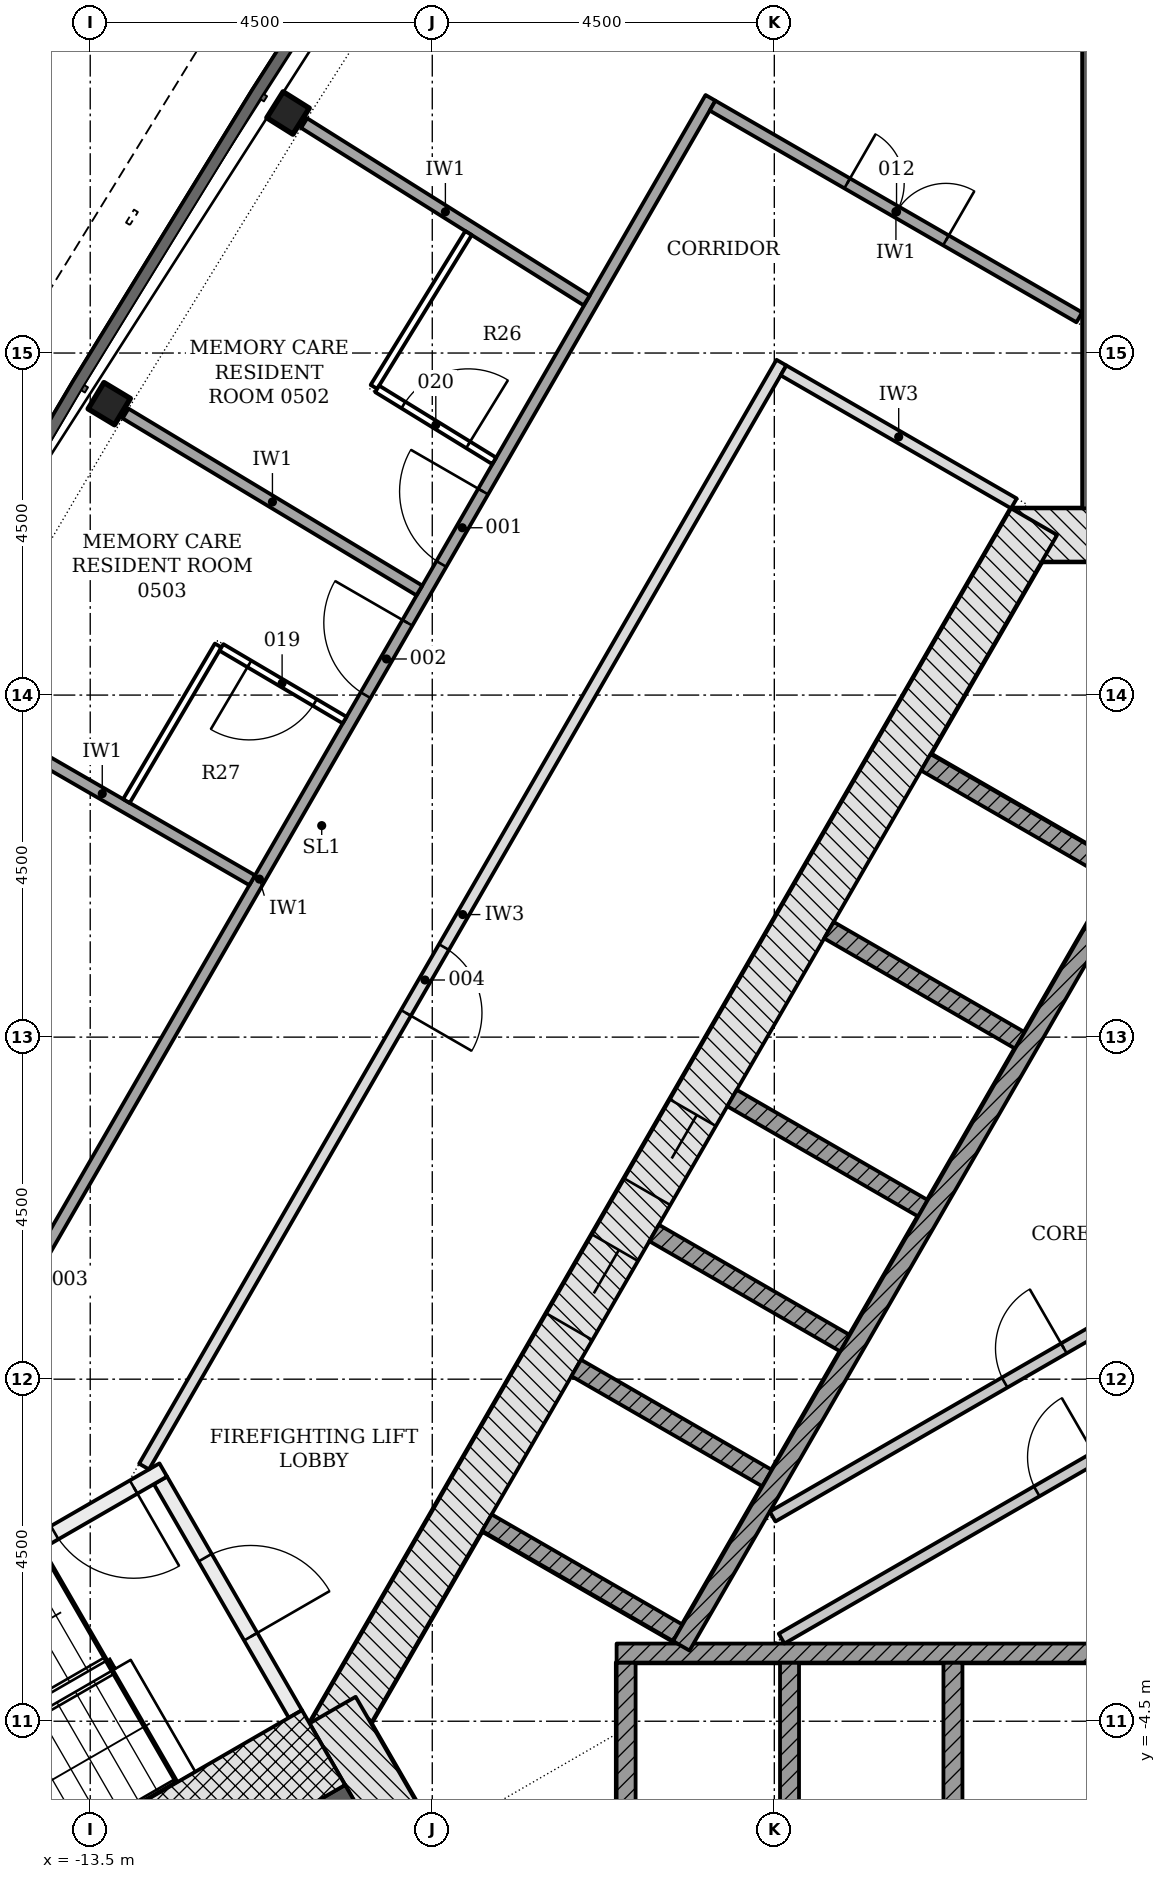
"""IFC4 building model, lengths in metres.
Left out: names, types, materials, properties, quantities, classifications, styles, units other than length and angle.
Written with IfcOpenShell. Run it as: python <this file> out.ifc"""

import sys

from ifc_helpers import new_model, si_unit, direction, frame, frame_2d, origin, origin_2d, place, context, subcontext, project, spatial, rectangle, i_section, extrude, element, fill, save


model = new_model("IFC4")
c1 = context("Model", 3, precision=1e-05, world=origin(), true_north=direction((0.0, 1.0)))
c2 = subcontext(c1, "Body", "Model", "MODEL_VIEW")
j1 = project(units=[si_unit("LENGTHUNIT", "METRE"), si_unit("PLANEANGLEUNIT", "RADIAN")], contexts=[c1])
p1 = place(None, origin())
s1 = spatial("IfcSite", under=j1, at=p1, CompositionType="ELEMENT")
p2 = place(p1, origin())
s2 = spatial("IfcBuilding", under=s1, at=p2, CompositionType="ELEMENT")
p3 = place(p2, frame((0.0, 0.0, 24.0)))
s3 = spatial("IfcBuildingStorey", under=s2, at=p3, CompositionType="ELEMENT", Elevation=24.0)
p4 = place(p3, frame((1.386, 11.106, -0.2), z_axis=(0.0, 0.0, 1.0), x_axis=(-1.0, 0.0, 0.0)))
e1 = element("IfcWall", 1, at=p4, inside=s3, PredefinedType="SHEAR", context=c2, shape_type="SweptSolid", body=[
    extrude(rectangle(XDim=2.771, YDim=0.7, at=frame_2d((1.386, 0.0))), origin(), (0.0, 0.0, 1.0), 3.6),
])
p5 = place(p3, frame((-1.083, 11.281, -0.2), z_axis=(0.0, 0.0, 1.0), x_axis=(-0.500001446645, -0.866024568562, 0.0)))
e2 = element("IfcWall", 2, at=p5, inside=s3, PredefinedType="SHEAR", context=c2, shape_type="SweptSolid", body=[
    extrude(rectangle(XDim=18.458, YDim=0.7, at=frame_2d((9.229, 0.0))), origin(), (0.0, 0.0, 1.0), 3.6),
])
p6 = place(p5, frame((8.979, 0.0, 0.2)))
e3 = element("IfcOpeningElement", 3, at=p6, cuts=e2, PredefinedType="OPENING", context=c2, shape_type="SweptSolid", body=[
    extrude(rectangle(XDim=1.2, YDim=2.1, at=frame_2d((0.6, 1.05))), frame((0.0, 0.36, 0.0), z_axis=(0.0, -1.0, 0.0), x_axis=(1.0, 0.0, 0.0)), (0.0, 0.0, 1.0), 0.72),
])
p7 = place(p5, frame((11.029, 0.0, 0.2)))
e4 = element("IfcOpeningElement", 4, at=p7, cuts=e2, PredefinedType="OPENING", context=c2, shape_type="SweptSolid", body=[
    extrude(rectangle(XDim=1.2, YDim=2.1, at=frame_2d((0.6, 1.05))), frame((0.0, 0.36, 0.0), z_axis=(0.0, -1.0, 0.0), x_axis=(1.0, 0.0, 0.0)), (0.0, 0.0, 1.0), 0.72),
])
p8 = place(p3, frame((-10.311, -4.353, -0.2), z_axis=(0.0, 0.0, 1.0), x_axis=(0.500042739161, -0.866000726912, 0.0)))
e5 = element("IfcWall", 5, at=p8, inside=s3, PredefinedType="SHEAR", context=c2, shape_type="SweptSolid", body=[
    extrude(rectangle(XDim=2.771, YDim=0.7, at=frame_2d((1.386, 0.0))), origin(), (0.0, 0.0, 1.0), 3.6),
])
p9 = place(p3, frame((0.0, 11.456, -0.2), z_axis=(0.0, 0.0, 1.0), x_axis=(0.0, 1.0, 0.0)))
e6 = element("IfcWall", 6, at=p9, inside=s3, PredefinedType="SHEAR", context=c2, shape_type="SweptSolid", body=[
    extrude(rectangle(XDim=14.633, YDim=0.9, at=frame_2d((7.316, 0.0))), origin(), (0.0, 0.0, 1.0), 3.6),
])
p10 = place(p3, frame((-9.922, -5.728, -0.2), z_axis=(0.0, 0.0, 1.0), x_axis=(-0.866028046028, -0.499995423472, 0.0)))
e7 = element("IfcWall", 7, at=p10, inside=s3, PredefinedType="SHEAR", context=c2, shape_type="SweptSolid", body=[
    extrude(rectangle(XDim=14.633, YDim=0.9, at=frame_2d((7.316, 0.0))), origin(), (0.0, 0.0, 1.0), 3.6),
])
for number, where, z_axis, x_axis in (
    (8, (-10.897, 16.658, -0.2), (0.0, 0.0, 1.0), (-0.532, -0.847, 0.0)),
    (9, (-13.25, 12.834, -0.2), (0.0, 0.0, 1.0), (-0.516, -0.857, 0.0)),
):
    element("IfcColumn", number, at=place(p3, frame(where, z_axis=z_axis, x_axis=x_axis)), inside=s3, PredefinedType="COLUMN", context=c2, shape_type="SweptSolid", body=[
        extrude(i_section(OverallWidth=0.404, OverallDepth=0.406, WebThickness=0.027, FlangeThickness=0.044, FilletRadius=0.015, at=origin_2d()), origin(), (0.0, 0.0, 1.0), 3.6),
    ])
for number, where, z_axis, x_axis in (
    (10, (-6.45, -6.228, -0.2), (0.0, 0.0, 1.0), (0.0, 1.0, 0.0)),
    (11, (-4.3, -6.228, -0.2), (0.0, 0.0, 1.0), (0.0, 1.0, 0.0)),
    (12, (-2.15, -6.228, -0.2), (0.0, 0.0, 1.0), (0.0, 1.0, 0.0)),
):
    element("IfcWall", number, at=place(p3, frame(where, z_axis=z_axis, x_axis=x_axis)), inside=s3, PredefinedType="PARTITIONING", context=c2, shape_type="SweptSolid", body=[
        extrude(rectangle(XDim=2.5, YDim=0.25, at=frame_2d((1.25, 0.0))), origin(), (0.0, 0.0, 1.0), 3.6),
    ])
p11 = place(p3, frame((-6.575, -3.603, 0.0), z_axis=(0.0, 0.0, 1.0), x_axis=(1.0, 0.0, 0.0)))
e13 = element("IfcWall", 13, at=p11, inside=s3, PredefinedType="PARTITIONING", context=c2, shape_type="SweptSolid", body=[
    extrude(rectangle(XDim=13.15, YDim=0.25, at=frame_2d((6.575, 0.0))), origin(), (0.0, 0.0, 1.0), 3.4),
])
p12 = place(p3, frame((-2.506, 8.115, -0.2), z_axis=(0.0, 0.0, 1.0), x_axis=(0.865996321171, -0.50005036918, 0.0)))
e14 = element("IfcWall", 14, at=p12, inside=s3, PredefinedType="PARTITIONING", context=c2, shape_type="SweptSolid", body=[
    extrude(rectangle(XDim=2.9, YDim=0.25, at=frame_2d((1.45, 0.0))), origin(), (0.0, 0.0, 1.0), 3.6),
])
for number, where, z_axis, x_axis in (
    (15, (-3.781, 5.907, -0.2), (0.0, 0.0, 1.0), (0.866, -0.5, 0.0)),
    (16, (-5.056, 3.699, -0.2), (0.0, 0.0, 1.0), (0.866, -0.5, 0.0)),
    (17, (-6.081, 1.923, -0.2), (0.0, 0.0, 1.0), (0.866, -0.5, 0.0)),
    (18, (-7.106, 0.148, -0.2), (0.0, 0.0, 1.0), (0.866, -0.5, 0.0)),
    (19, (-8.281, -1.887, -0.2), (0.0, 0.0, 1.0), (0.866, -0.5, 0.0)),
):
    element("IfcWall", number, at=place(p3, frame(where, z_axis=z_axis, x_axis=x_axis)), inside=s3, PredefinedType="PARTITIONING", context=c2, shape_type="SweptSolid", body=[
        extrude(rectangle(XDim=2.9, YDim=0.25, at=frame_2d((1.45, 0.0))), origin(), (0.0, 0.0, 1.0), 3.6),
    ])
p13 = place(p3, frame((0.176, 6.711, 0.0), z_axis=(0.0, 0.0, 1.0), x_axis=(-0.500004227369, -0.866022963098, 0.0)))
e20 = element("IfcWall", 20, at=p13, inside=s3, PredefinedType="PARTITIONING", context=c2, shape_type="SweptSolid", body=[
    extrude(rectangle(XDim=11.8, YDim=0.25, at=frame_2d((5.9, 0.0))), origin(), (0.0, 0.0, 1.0), 3.4),
])
p14 = place(p3, frame((-4.523, -1.807, 0.0), z_axis=(0.0, 0.0, 1.0), x_axis=(0.866030300338, 0.499991518824, 0.0)))
e21 = element("IfcWall", 21, at=p14, inside=s3, PredefinedType="PARTITIONING", context=c2, shape_type="SweptSolid", body=[
    extrude(rectangle(XDim=11.049, YDim=0.15, at=frame_2d((5.524, 0.0))), origin(), (0.0, 0.0, 1.0), 3.4),
])
p15 = place(p14, frame((3.525, 0.0, 0.0)))
e22 = element("IfcOpeningElement", 22, at=p15, cuts=e21, PredefinedType="OPENING", context=c2, shape_type="SweptSolid", body=[
    extrude(rectangle(XDim=0.9, YDim=2.1, at=frame_2d((0.45, 1.05))), frame((0.0, 0.085, 0.0), z_axis=(0.0, -1.0, 0.0), x_axis=(1.0, 0.0, 0.0)), (0.0, 0.0, 1.0), 0.17),
])
p16 = place(p3, frame((-4.404, -3.413, 0.0), z_axis=(0.0, 0.0, 1.0), x_axis=(0.866022252853, 0.500005457533, 0.0)))
e23 = element("IfcWall", 23, at=p16, inside=s3, PredefinedType="PARTITIONING", context=c2, shape_type="SweptSolid", body=[
    extrude(rectangle(XDim=11.749, YDim=0.15, at=frame_2d((5.875, 0.0))), origin(), (0.0, 0.0, 1.0), 3.4),
])
p17 = place(p16, frame((3.875, 0.0, 0.0)))
e24 = element("IfcOpeningElement", 24, at=p17, cuts=e23, PredefinedType="OPENING", context=c2, shape_type="SweptSolid", body=[
    extrude(rectangle(XDim=0.9, YDim=2.1, at=frame_2d((0.45, 1.05))), frame((0.0, 0.085, 0.0), z_axis=(0.0, -1.0, 0.0), x_axis=(1.0, 0.0, 0.0)), (0.0, 0.0, 1.0), 0.17),
])
p18 = place(p3, frame((-12.576, -1.331, -0.2), z_axis=(0.0, 0.0, 1.0), x_axis=(0.499970499736, -0.8660424351, 0.0)))
e25 = element("IfcWall", 25, at=p18, inside=s3, PredefinedType="SHEAR", context=c2, shape_type="SweptSolid", body=[
    extrude(rectangle(XDim=3.55, YDim=0.2, at=frame_2d((1.775, 0.0))), origin(), (0.0, 0.0, 1.0), 3.6),
])
p19 = place(p18, frame((1.175, 0.0, 0.2)))
e26 = element("IfcOpeningElement", 26, at=p19, cuts=e25, PredefinedType="OPENING", context=c2, shape_type="SweptSolid", body=[
    extrude(rectangle(XDim=1.2, YDim=2.1, at=frame_2d((0.6, 1.05))), frame((0.0, 0.11, 0.0), z_axis=(0.0, -1.0, 0.0), x_axis=(1.0, 0.0, 0.0)), (0.0, 0.0, 1.0), 0.22),
])
p20 = place(p3, frame((-12.539, -1.194, -0.2), z_axis=(0.0, 0.0, 1.0), x_axis=(-0.866045472092, -0.499965239061, 0.0)))
e27 = element("IfcWall", 27, at=p20, inside=s3, PredefinedType="SHEAR", context=c2, shape_type="SweptSolid", body=[
    extrude(rectangle(XDim=5.6, YDim=0.2, at=frame_2d((2.8, 0.0))), origin(), (0.0, 0.0, 1.0), 3.6),
])
p21 = place(p20, frame((0.45, 0.0, 0.2)))
e28 = element("IfcOpeningElement", 28, at=p21, cuts=e27, PredefinedType="OPENING", context=c2, shape_type="SweptSolid", body=[
    extrude(rectangle(XDim=1.2, YDim=2.1, at=frame_2d((0.6, 1.05))), frame((0.0, 0.11, 0.0), z_axis=(0.0, -1.0, 0.0), x_axis=(1.0, 0.0, 0.0)), (0.0, 0.0, 1.0), 0.22),
])
p22 = place(p3, frame((-10.43, -4.847, -0.2), z_axis=(0.0, 0.0, 1.0), x_axis=(-0.866018442252, -0.500012057535, 0.0)))
e29 = element("IfcWall", 29, at=p22, inside=s3, PredefinedType="SHEAR", context=c2, shape_type="SweptSolid", body=[
    extrude(rectangle(XDim=7.2, YDim=1.136, at=frame_2d((3.6, 0.0))), origin(), (0.0, 0.0, 1.0), 3.6),
])
p23 = place(p3, frame((-17.208, -3.699, 0.0), z_axis=(0.0, 0.0, 1.0), x_axis=(0.499997567621, 0.866026808115, 0.0)))
e30 = element("IfcWall", 30, at=p23, inside=s3, PredefinedType="PARTITIONING", context=c2, shape_type="SweptSolid", body=[
    extrude(rectangle(XDim=23.736, YDim=0.15, at=frame_2d((11.868, 0.0))), origin(), (0.0, 0.0, 1.0), 2.768),
])
p24 = place(p23, frame((16.656, 0.0, 0.0)))
e31 = element("IfcOpeningElement", 31, at=p24, cuts=e30, PredefinedType="OPENING", context=c2, shape_type="SweptSolid", body=[
    extrude(rectangle(XDim=1.1, YDim=2.1, at=frame_2d((0.55, 1.05))), frame((0.0, 0.085, 0.0), z_axis=(0.0, -1.0, 0.0), x_axis=(1.0, 0.0, 0.0)), (0.0, 0.0, 1.0), 0.17),
])
p25 = place(p23, frame((14.662, 0.0, 0.0)))
e32 = element("IfcOpeningElement", 32, at=p25, cuts=e30, PredefinedType="OPENING", context=c2, shape_type="SweptSolid", body=[
    extrude(rectangle(XDim=1.1, YDim=2.1, at=frame_2d((0.55, 1.05))), frame((0.0, 0.085, 0.0), z_axis=(0.0, -1.0, 0.0), x_axis=(1.0, 0.0, 0.0)), (0.0, 0.0, 1.0), 0.17),
])
p26 = place(p23, frame((5.273, 0.0, 0.0)))
e33 = element("IfcOpeningElement", 33, at=p26, cuts=e30, PredefinedType="OPENING", context=c2, shape_type="SweptSolid", body=[
    extrude(rectangle(XDim=1.0, YDim=2.1, at=frame_2d((0.5, 1.05))), frame((0.0, 0.085, 0.0), z_axis=(0.0, -1.0, 0.0), x_axis=(1.0, 0.0, 0.0)), (0.0, 0.0, 1.0), 0.17),
])
p27 = place(p3, frame((-4.407, 13.374, 0.0), z_axis=(0.0, 0.0, 1.0), x_axis=(-0.499997181693, -0.866027030928, 0.0)))
e34 = element("IfcWall", 34, at=p27, inside=s3, PredefinedType="PARTITIONING", context=c2, shape_type="SweptSolid", body=[
    extrude(rectangle(XDim=16.77, YDim=0.15, at=frame_2d((8.385, 0.0))), origin(), (0.0, 0.0, 1.0), 2.768),
])
p28 = place(p27, frame((8.879, 0.0, 0.0)))
e35 = element("IfcOpeningElement", 35, at=p28, cuts=e34, PredefinedType="OPENING", context=c2, shape_type="SweptSolid", body=[
    extrude(rectangle(XDim=1.0, YDim=2.1, at=frame_2d((0.5, 1.05))), frame((0.0, 0.085, 0.0), z_axis=(0.0, -1.0, 0.0), x_axis=(1.0, 0.0, 0.0)), (0.0, 0.0, 1.0), 0.17),
])
p29 = place(p3, frame((-5.312, 16.755, 0.0), z_axis=(0.0, 0.0, 1.0), x_axis=(0.866028693448, -0.499994302092, 0.0)))
e36 = element("IfcWall", 36, at=p29, inside=s3, PredefinedType="PARTITIONING", context=c2, shape_type="SweptSolid", body=[
    extrude(rectangle(XDim=5.571, YDim=0.15, at=frame_2d((2.786, 0.0))), origin(), (0.0, 0.0, 1.0), 3.4),
])
p30 = place(p29, frame((2.045, 0.0, 0.0)))
e37 = element("IfcOpeningElement", 37, at=p30, cuts=e36, PredefinedType="OPENING", context=c2, shape_type="SweptSolid", body=[
    extrude(rectangle(XDim=1.5, YDim=2.1, at=frame_2d((0.75, 1.05))), frame((0.0, 0.085, 0.0), z_axis=(0.0, -1.0, 0.0), x_axis=(1.0, 0.0, 0.0)), (0.0, 0.0, 1.0), 0.17),
])
p31 = place(p3, frame((-4.379, 13.271, 0.0), z_axis=(0.0, 0.0, 1.0), x_axis=(0.866019471182, -0.500010275428, 0.0)))
e38 = element("IfcWall", 38, at=p31, inside=s3, PredefinedType="PARTITIONING", context=c2, shape_type="SweptSolid", body=[
    extrude(rectangle(XDim=3.5, YDim=0.15, at=frame_2d((1.75, 0.0))), origin(), (0.0, 0.0, 1.0), 3.4),
])
p32 = place(p3, frame((-15.314, 8.842, 0.0), z_axis=(0.0, 0.0, 1.0), x_axis=(0.866031166731, -0.499990018151, 0.0)))
e39 = element("IfcWall", 39, at=p32, inside=s3, PredefinedType="PARTITIONING", context=c2, shape_type="SweptSolid", body=[
    extrude(rectangle(XDim=4.555, YDim=0.15, at=frame_2d((2.277, 0.0))), origin(), (0.0, 0.0, 1.0), 2.768),
])
p33 = place(p3, frame((-13.036, 12.705, 0.0), z_axis=(0.0, 0.0, 1.0), x_axis=(0.856594224171, -0.515990634719, 0.0)))
e40 = element("IfcWall", 40, at=p33, inside=s3, PredefinedType="PARTITIONING", context=c2, shape_type="SweptSolid", body=[
    extrude(rectangle(XDim=4.513, YDim=0.15, at=frame_2d((2.256, 0.0))), origin(), (0.0, 0.0, 1.0), 2.768),
])
p34 = place(p3, frame((-10.686, 16.525, 0.0), z_axis=(0.0, 0.0, 1.0), x_axis=(0.846871345174, -0.531797823165, 0.0)))
e41 = element("IfcWall", 41, at=p34, inside=s3, PredefinedType="PARTITIONING", context=c2, shape_type="SweptSolid", body=[
    extrude(rectangle(XDim=4.389, YDim=0.15, at=frame_2d((2.194, 0.0))), origin(), (0.0, 0.0, 1.0), 2.768),
])
for number, where, z_axis, x_axis in (
    (42, (-8.523, 15.078, 0.0), (0.0, 0.0, 1.0), (-0.524, -0.852, 0.0)),
    (43, (-13.024, 7.606, 0.0), (0.0, 0.0, 1.0), (0.508, 0.861, 0.0)),
):
    element("IfcWall", number, at=place(p3, frame(where, z_axis=z_axis, x_axis=x_axis)), inside=s3, PredefinedType="PARTITIONING", context=c2, shape_type="SweptSolid", body=[
        extrude(rectangle(XDim=2.375, YDim=0.1, at=frame_2d((1.188, 0.0))), origin(), (0.0, 0.0, 1.0), 2.768),
    ])
p35 = place(p3, frame((-10.153, 8.671, 0.0), z_axis=(0.0, 0.0, 1.0), x_axis=(-0.861326599867, 0.508051659147, 0.0)))
e44 = element("IfcWall", 44, at=p35, inside=s3, PredefinedType="PARTITIONING", context=c2, shape_type="SweptSolid", body=[
    extrude(rectangle(XDim=1.882, YDim=0.1, at=frame_2d((0.941, 0.0))), origin(), (0.0, 0.0, 1.0), 3.4),
])
p36 = place(p35, frame((0.455, 0.0, 0.0)))
e45 = element("IfcOpeningElement", 45, at=p36, cuts=e44, PredefinedType="OPENING", context=c2, shape_type="SweptSolid", body=[
    extrude(rectangle(XDim=1.0, YDim=2.1, at=frame_2d((0.5, 1.05))), frame((0.0, 0.06, 0.0), z_axis=(0.0, -1.0, 0.0), x_axis=(1.0, 0.0, 0.0)), (0.0, 0.0, 1.0), 0.12),
])
p37 = place(p3, frame((-9.725, 13.029, 0.0), z_axis=(0.0, 0.0, 1.0), x_axis=(0.851755692017, -0.523939157839, 0.0)))
e46 = element("IfcWall", 46, at=p37, inside=s3, PredefinedType="PARTITIONING", context=c2, shape_type="SweptSolid", body=[
    extrude(rectangle(XDim=1.808, YDim=0.1, at=frame_2d((0.904, 0.0))), origin(), (0.0, 0.0, 1.0), 3.4),
])
p38 = place(p37, frame((0.406, 0.0, 0.0)))
e47 = element("IfcOpeningElement", 47, at=p38, cuts=e46, PredefinedType="OPENING", context=c2, shape_type="SweptSolid", body=[
    extrude(rectangle(XDim=1.0, YDim=2.1, at=frame_2d((0.5, 1.05))), frame((0.0, 0.06, 0.0), z_axis=(0.0, -1.0, 0.0), x_axis=(1.0, 0.0, 0.0)), (0.0, 0.0, 1.0), 0.12),
])
p39 = place(p6, origin())
e48 = element("IfcDoor", 48, at=p39, inside=s3, OperationType="DOUBLE_DOOR_SLIDING", PredefinedType="DOOR", context=c2, shape_type="SweptSolid", body=[
    extrude(rectangle(XDim=1.2, YDim=2.1, at=frame_2d((0.6, 1.05))), frame((0.0, 0.025, 0.0), z_axis=(0.0, -1.0, 0.0), x_axis=(1.0, 0.0, 0.0)), (0.0, 0.0, 1.0), 0.05),
])
fill(e3, e48)
p40 = place(p7, origin())
e49 = element("IfcDoor", 49, at=p40, inside=s3, OperationType="DOUBLE_DOOR_SLIDING", PredefinedType="DOOR", context=c2, shape_type="SweptSolid", body=[
    extrude(rectangle(XDim=1.2, YDim=2.1, at=frame_2d((0.6, 1.05))), frame((0.0, 0.025, 0.0), z_axis=(0.0, -1.0, 0.0), x_axis=(1.0, 0.0, 0.0)), (0.0, 0.0, 1.0), 0.05),
])
fill(e4, e49)
p41 = place(p17, origin())
e50 = element("IfcDoor", 50, at=p41, inside=s3, OperationType="SINGLE_SWING_RIGHT", PredefinedType="DOOR", context=c2, shape_type="SweptSolid", body=[
    extrude(rectangle(XDim=0.9, YDim=2.1, at=frame_2d((0.45, 1.05))), frame((0.0, 0.025, 0.0), z_axis=(0.0, -1.0, 0.0), x_axis=(1.0, 0.0, 0.0)), (0.0, 0.0, 1.0), 0.05),
])
fill(e24, e50)
p42 = place(p15, origin())
e51 = element("IfcDoor", 51, at=p42, inside=s3, OperationType="SINGLE_SWING_RIGHT", PredefinedType="DOOR", context=c2, shape_type="SweptSolid", body=[
    extrude(rectangle(XDim=0.9, YDim=2.1, at=frame_2d((0.45, 1.05))), frame((0.0, 0.025, 0.0), z_axis=(0.0, -1.0, 0.0), x_axis=(1.0, 0.0, 0.0)), (0.0, 0.0, 1.0), 0.05),
])
fill(e22, e51)
p43 = place(p19, origin())
e52 = element("IfcDoor", 52, at=p43, inside=s3, OperationType="SINGLE_SWING_RIGHT", PredefinedType="DOOR", context=c2, shape_type="SweptSolid", body=[
    extrude(rectangle(XDim=1.2, YDim=2.1, at=frame_2d((0.6, 1.05))), frame((0.0, 0.025, 0.0), z_axis=(0.0, -1.0, 0.0), x_axis=(1.0, 0.0, 0.0)), (0.0, 0.0, 1.0), 0.05),
])
fill(e26, e52)
p44 = place(p21, origin())
e53 = element("IfcDoor", 53, at=p44, inside=s3, OperationType="SINGLE_SWING_LEFT", PredefinedType="DOOR", context=c2, shape_type="SweptSolid", body=[
    extrude(rectangle(XDim=1.2, YDim=2.1, at=frame_2d((0.6, 1.05))), frame((0.0, 0.025, 0.0), z_axis=(0.0, -1.0, 0.0), x_axis=(1.0, 0.0, 0.0)), (0.0, 0.0, 1.0), 0.05),
])
fill(e28, e53)
p45 = place(p24, origin())
e54 = element("IfcDoor", 54, at=p45, inside=s3, OperationType="SINGLE_SWING_RIGHT", PredefinedType="DOOR", context=c2, shape_type="SweptSolid", body=[
    extrude(rectangle(XDim=1.1, YDim=2.1, at=frame_2d((0.55, 1.05))), frame((0.0, 0.025, 0.0), z_axis=(0.0, -1.0, 0.0), x_axis=(1.0, 0.0, 0.0)), (0.0, 0.0, 1.0), 0.05),
])
fill(e31, e54)
p46 = place(p25, origin())
e55 = element("IfcDoor", 55, at=p46, inside=s3, OperationType="SINGLE_SWING_RIGHT", PredefinedType="DOOR", context=c2, shape_type="SweptSolid", body=[
    extrude(rectangle(XDim=1.1, YDim=2.1, at=frame_2d((0.55, 1.05))), frame((0.0, 0.025, 0.0), z_axis=(0.0, -1.0, 0.0), x_axis=(1.0, 0.0, 0.0)), (0.0, 0.0, 1.0), 0.05),
])
fill(e32, e55)
p47 = place(p28, origin())
e56 = element("IfcDoor", 56, at=p47, inside=s3, OperationType="SINGLE_SWING_RIGHT", PredefinedType="DOOR", context=c2, shape_type="SweptSolid", body=[
    extrude(rectangle(XDim=1.0, YDim=2.1, at=frame_2d((0.5, 1.05))), frame((0.0, 0.025, 0.0), z_axis=(0.0, -1.0, 0.0), x_axis=(1.0, 0.0, 0.0)), (0.0, 0.0, 1.0), 0.05),
])
fill(e35, e56)
p48 = place(p30, origin())
e57 = element("IfcDoor", 57, at=p48, inside=s3, OperationType="DOUBLE_DOOR_SINGLE_SWING", PredefinedType="DOOR", context=c2, shape_type="SweptSolid", body=[
    extrude(rectangle(XDim=1.5, YDim=2.1, at=frame_2d((0.75, 1.05))), frame((0.0, 0.025, 0.0), z_axis=(0.0, -1.0, 0.0), x_axis=(1.0, 0.0, 0.0)), (0.0, 0.0, 1.0), 0.05),
])
fill(e37, e57)
p49 = place(p36, origin())
e58 = element("IfcDoor", 58, at=p49, inside=s3, OperationType="SINGLE_SWING_RIGHT", PredefinedType="DOOR", context=c2, shape_type="SweptSolid", body=[
    extrude(rectangle(XDim=1.0, YDim=2.1, at=frame_2d((0.5, 1.05))), frame((0.0, 0.025, 0.0), z_axis=(0.0, -1.0, 0.0), x_axis=(1.0, 0.0, 0.0)), (0.0, 0.0, 1.0), 0.05),
])
fill(e45, e58)
p50 = place(p38, origin())
e59 = element("IfcDoor", 59, at=p50, inside=s3, OperationType="SINGLE_SWING_RIGHT", PredefinedType="DOOR", context=c2, shape_type="SweptSolid", body=[
    extrude(rectangle(XDim=1.0, YDim=2.1, at=frame_2d((0.5, 1.05))), frame((0.0, 0.025, 0.0), z_axis=(0.0, -1.0, 0.0), x_axis=(1.0, 0.0, 0.0)), (0.0, 0.0, 1.0), 0.05),
])
fill(e47, e59)
save(model, sys.argv[1])
